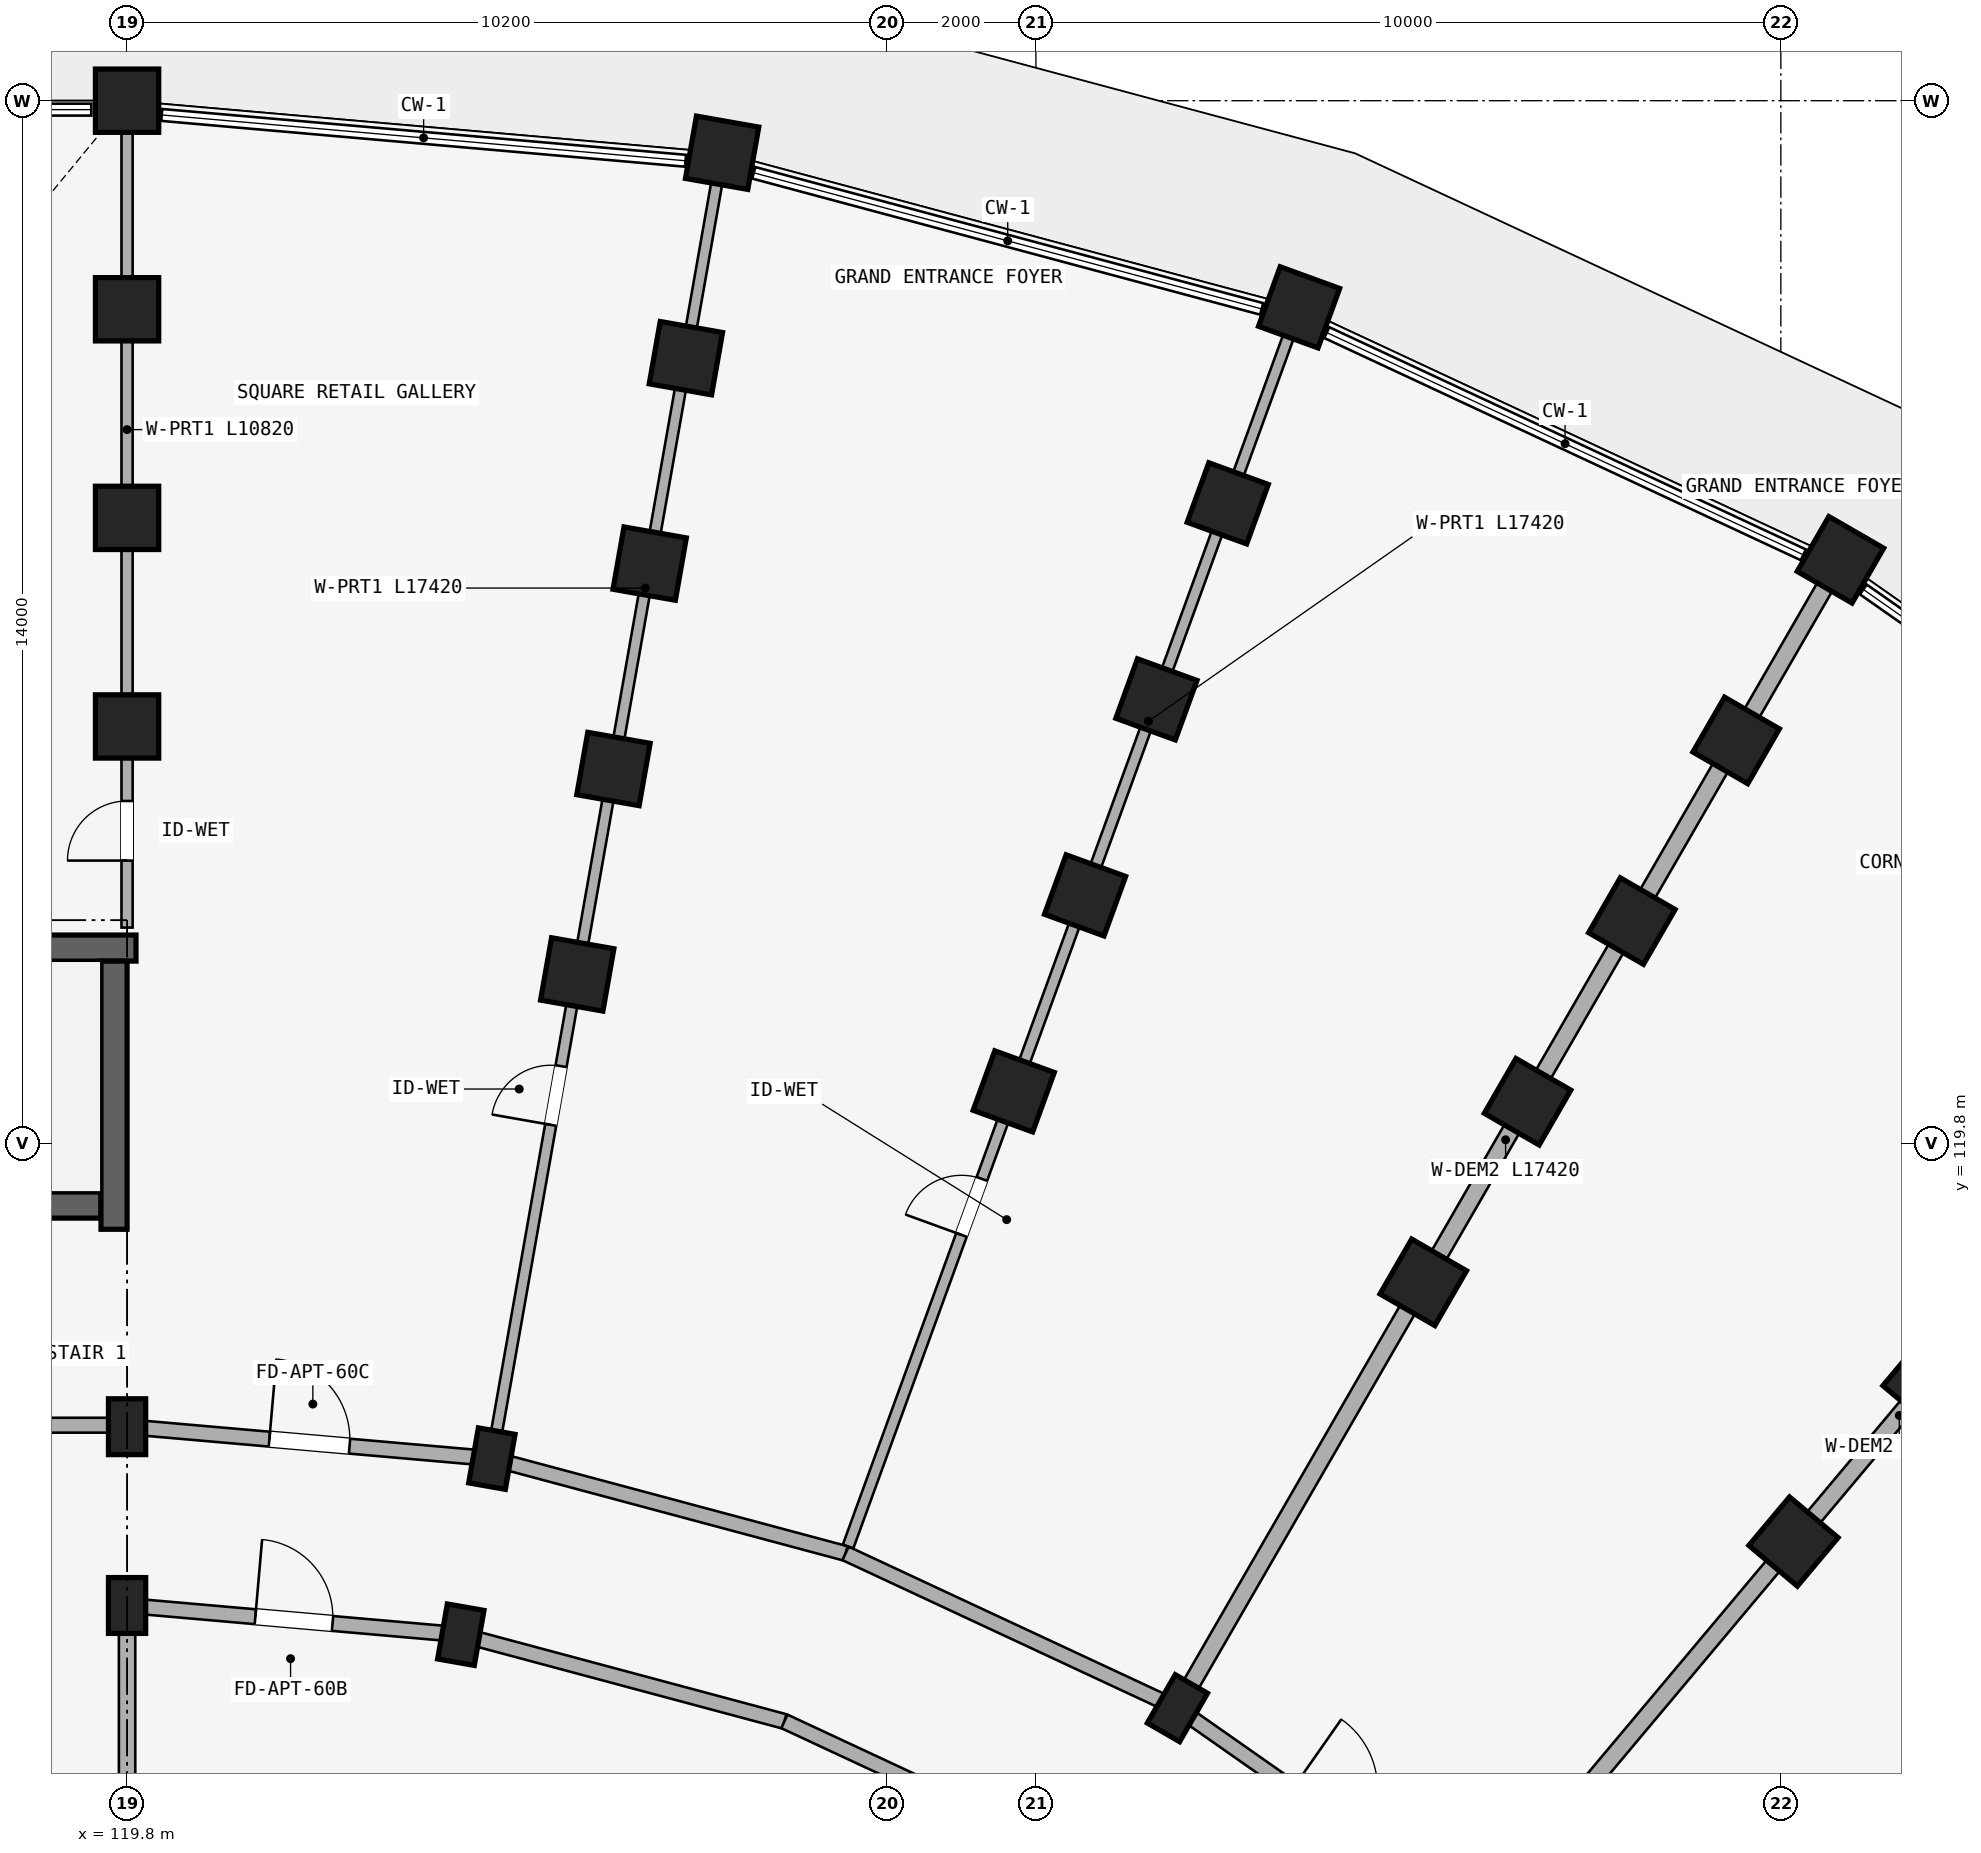
"""IFC4 building model, lengths in metres.
Left out: names, types, materials, properties, quantities, classifications, styles, units other than length and angle.
Written with IfcOpenShell. Run it as: python <this file> out.ifc"""

import sys

from ifc_helpers import new_model, si_unit, direction, frame, frame_2d, origin, origin_2d, place, context, subcontext, project, spatial, rectangle, extrude, element, fill, save


model = new_model("IFC4")
c1 = context("Model", 3, precision=1e-05, world=origin(), true_north=direction((0.0, 1.0)))
c2 = subcontext(c1, "Body", "Model", "MODEL_VIEW")
j1 = project(units=[si_unit("LENGTHUNIT", "METRE"), si_unit("PLANEANGLEUNIT", "RADIAN")], contexts=[c1])
p1 = place(None, origin())
s1 = spatial("IfcSite", under=j1, at=p1, CompositionType="ELEMENT")
p2 = place(p1, origin())
s2 = spatial("IfcBuilding", under=s1, at=p2, CompositionType="ELEMENT")
p3 = place(p2, origin())
s3 = spatial("IfcBuildingStorey", under=s2, at=p3, CompositionType="ELEMENT", Elevation=0.0)
p4 = place(p3, frame((119.92, 122.425, 0.0), z_axis=(0.0, 0.0, 1.0), x_axis=(-1.0, 0.0, 0.0)))
e1 = element("IfcWall", 1, at=p4, inside=s3, PredefinedType="SHEAR", context=c2, shape_type="SweptSolid", body=[
    extrude(rectangle(XDim=8.545, YDim=0.35, at=frame_2d((4.272, 0.0))), origin(), (0.0, 0.0, 1.0), 4.15),
])
p5 = place(p3, frame((119.45, 118.975, 0.0), z_axis=(0.0, 0.0, 1.0), x_axis=(-1.0, 0.0, 0.0)))
e2 = element("IfcWall", 2, at=p5, inside=s3, PredefinedType="SHEAR", context=c2, shape_type="SweptSolid", body=[
    extrude(rectangle(XDim=8.075, YDim=0.35, at=frame_2d((4.038, 0.0))), origin(), (0.0, 0.0, 1.0), 4.15),
])
p6 = place(p5, frame((6.38, 0.0, 0.0)))
e3 = element("IfcOpeningElement", 3, at=p6, cuts=e2, PredefinedType="OPENING", context=c2, shape_type="SweptSolid", body=[
    extrude(rectangle(XDim=1.24, YDim=2.15, at=frame_2d((0.62, 1.075))), frame((0.0, 0.185, 0.0), z_axis=(0.0, -1.0, 0.0), x_axis=(1.0, 0.0, 0.0)), (0.0, 0.0, 1.0), 0.37),
])
p7 = place(p3, frame((119.625, 118.65, 0.0), z_axis=(0.0, 0.0, 1.0), x_axis=(0.0, 1.0, 0.0)))
e4 = element("IfcWall", 4, at=p7, inside=s3, PredefinedType="SHEAR", context=c2, shape_type="SweptSolid", body=[
    extrude(rectangle(XDim=3.6, YDim=0.35, at=frame_2d((1.8, 0.0))), origin(), (0.0, 0.0, 1.0), 4.15),
])
for number, where, z_axis, x_axis in (
    (5, (119.8, 113.6, 0.0), (0.0, 0.0, 1.0), (1.0, 0.0, 0.0)),
    (6, (119.8, 116.0, 0.0), (0.0, 0.0, 1.0), (1.0, 0.0, 0.0)),
):
    element("IfcColumn", number, at=place(p3, frame(where, z_axis=z_axis, x_axis=x_axis)), inside=s3, PredefinedType="COLUMN", context=c2, shape_type="SweptSolid", body=[
        extrude(rectangle(XDim=0.5, YDim=0.75, at=origin_2d()), origin(), (0.0, 0.0, 1.0), 4.15),
    ])
for number, where, z_axis, x_axis in (
    (7, (119.8, 125.4, 0.0), (0.0, 0.0, 1.0), (1.0, 0.0, 0.0)),
    (8, (119.8, 128.2, 0.0), (0.0, 0.0, 1.0), (1.0, 0.0, 0.0)),
    (9, (119.8, 131.0, 0.0), (0.0, 0.0, 1.0), (1.0, 0.0, 0.0)),
    (10, (119.8, 133.8, 0.0), (0.0, 0.0, 1.0), (1.0, 0.0, 0.0)),
):
    element("IfcColumn", number, at=place(p3, frame(where, z_axis=z_axis, x_axis=x_axis)), inside=s3, PredefinedType="COLUMN", context=c2, shape_type="SweptSolid", body=[
        extrude(rectangle(XDim=0.85, YDim=0.85, at=origin_2d()), origin(), (0.0, 0.0, 1.0), 4.15),
    ])
for number, where, z_axis, x_axis in (
    (11, (124.28, 113.208, 0.0), (0.0, 0.0, 1.0), (-0.985, 0.174, 0.0)),
    (12, (124.697, 115.572, 0.0), (0.0, 0.0, 1.0), (-0.985, 0.174, 0.0)),
):
    element("IfcColumn", number, at=place(p3, frame(where, z_axis=z_axis, x_axis=x_axis)), inside=s3, PredefinedType="COLUMN", context=c2, shape_type="SweptSolid", body=[
        extrude(rectangle(XDim=0.5, YDim=0.75, at=origin_2d()), origin(), (0.0, 0.0, 1.0), 4.15),
    ])
for number, where, z_axis, x_axis in (
    (13, (125.843, 122.071, 0.0), (0.0, 0.0, 1.0), (-0.985, 0.174, 0.0)),
    (14, (126.329, 124.829, 0.0), (0.0, 0.0, 1.0), (-0.985, 0.174, 0.0)),
    (15, (126.815, 127.586, 0.0), (0.0, 0.0, 1.0), (-0.985, 0.174, 0.0)),
    (16, (127.302, 130.344, 0.0), (0.0, 0.0, 1.0), (-0.985, 0.174, 0.0)),
    (17, (127.788, 133.101, 0.0), (0.0, 0.0, 1.0), (-0.985, 0.174, 0.0)),
    (18, (131.702, 120.501, 0.0), (0.0, 0.0, 1.0), (-0.94, 0.342, 0.0)),
    (19, (132.66, 123.132, 0.0), (0.0, 0.0, 1.0), (-0.94, 0.342, 0.0)),
    (20, (133.618, 125.764, 0.0), (0.0, 0.0, 1.0), (-0.94, 0.342, 0.0)),
    (21, (134.575, 128.395, 0.0), (0.0, 0.0, 1.0), (-0.94, 0.342, 0.0)),
    (22, (135.533, 131.026, 0.0), (0.0, 0.0, 1.0), (-0.94, 0.342, 0.0)),
):
    element("IfcColumn", number, at=place(p3, frame(where, z_axis=z_axis, x_axis=x_axis)), inside=s3, PredefinedType="COLUMN", context=c2, shape_type="SweptSolid", body=[
        extrude(rectangle(XDim=0.85, YDim=0.85, at=origin_2d()), origin(), (0.0, 0.0, 1.0), 4.15),
    ])
p8 = place(p3, frame((133.9, 112.222, 0.0), z_axis=(0.0, 0.0, 1.0), x_axis=(-0.866025403784, 0.5, 0.0)))
e23 = element("IfcColumn", 23, at=p8, inside=s3, PredefinedType="COLUMN", context=c2, shape_type="SweptSolid", body=[
    extrude(rectangle(XDim=0.5, YDim=0.75, at=origin_2d()), origin(), (0.0, 0.0, 1.0), 4.15),
])
for number, where, z_axis, x_axis in (
    (24, (137.2, 117.938, 0.0), (0.0, 0.0, 1.0), (-0.866, 0.5, 0.0)),
    (25, (138.6, 120.363, 0.0), (0.0, 0.0, 1.0), (-0.866, 0.5, 0.0)),
    (26, (140.0, 122.787, 0.0), (0.0, 0.0, 1.0), (-0.866, 0.5, 0.0)),
    (27, (141.4, 125.212, 0.0), (0.0, 0.0, 1.0), (-0.866, 0.5, 0.0)),
    (28, (142.8, 127.637, 0.0), (0.0, 0.0, 1.0), (-0.866, 0.5, 0.0)),
    (29, (142.169, 114.458, 0.0), (0.0, 0.0, 1.0), (-0.766, 0.643, 0.0)),
    (30, (143.969, 116.603, 0.0), (0.0, 0.0, 1.0), (-0.766, 0.643, 0.0)),
):
    element("IfcColumn", number, at=place(p3, frame(where, z_axis=z_axis, x_axis=x_axis)), inside=s3, PredefinedType="COLUMN", context=c2, shape_type="SweptSolid", body=[
        extrude(rectangle(XDim=0.85, YDim=0.85, at=origin_2d()), origin(), (0.0, 0.0, 1.0), 4.15),
    ])
p9 = place(p3, frame((119.55, 116.02, 0.0), z_axis=(0.0, 0.0, 1.0), x_axis=(-1.0, 0.0, 0.0)))
e31 = element("IfcWall", 31, at=p9, inside=s3, PredefinedType="STANDARD", context=c2, shape_type="SweptSolid", body=[
    extrude(rectangle(XDim=5.25, YDim=0.2, at=frame_2d((2.625, 0.0))), origin(), (0.0, 0.0, 1.0), 3.492),
])
p10 = place(p9, frame((2.165, 0.0, 0.0)))
e32 = element("IfcOpeningElement", 32, at=p10, cuts=e31, PredefinedType="OPENING", context=c2, shape_type="SweptSolid", body=[
    extrude(rectangle(XDim=0.92, YDim=2.1, at=frame_2d((0.46, 1.05))), frame((0.0, 0.11, 0.0), z_axis=(0.0, -1.0, 0.0), x_axis=(1.0, 0.0, 0.0)), (0.0, 0.0, 1.0), 0.22),
])
p11 = place(p3, frame((119.8, 113.6, 0.0), z_axis=(0.0, 0.0, 1.0), x_axis=(0.996191949488, -0.087187153726, 0.0)))
e33 = element("IfcWall", 33, at=p11, inside=s3, PredefinedType="STANDARD", context=c2, shape_type="SweptSolid", body=[
    extrude(rectangle(XDim=4.497, YDim=0.2, at=frame_2d((2.249, 0.0))), origin(), (0.0, 0.0, 1.0), 3.492),
])
p12 = place(p11, frame((1.729, 0.0, 0.0)))
e34 = element("IfcOpeningElement", 34, at=p12, cuts=e33, PredefinedType="OPENING", context=c2, shape_type="SweptSolid", body=[
    extrude(rectangle(XDim=1.04, YDim=2.15, at=frame_2d((0.52, 1.075))), frame((0.0, 0.11, 0.0), z_axis=(0.0, -1.0, 0.0), x_axis=(1.0, 0.0, 0.0)), (0.0, 0.0, 1.0), 0.22),
])
p13 = place(p3, frame((119.8, 116.0, 0.0), z_axis=(0.0, 0.0, 1.0), x_axis=(0.996193663584, -0.087167566415, 0.0)))
e35 = element("IfcWall", 35, at=p13, inside=s3, PredefinedType="STANDARD", context=c2, shape_type="SweptSolid", body=[
    extrude(rectangle(XDim=4.916, YDim=0.2, at=frame_2d((2.458, 0.0))), origin(), (0.0, 0.0, 1.0), 3.492),
])
p14 = place(p13, frame((1.918, 0.0, 0.0)))
e36 = element("IfcOpeningElement", 36, at=p14, cuts=e35, PredefinedType="OPENING", context=c2, shape_type="SweptSolid", body=[
    extrude(rectangle(XDim=1.08, YDim=2.15, at=frame_2d((0.54, 1.075))), frame((0.0, 0.11, 0.0), z_axis=(0.0, -1.0, 0.0), x_axis=(1.0, 0.0, 0.0)), (0.0, 0.0, 1.0), 0.22),
])
p15 = place(p3, frame((124.28, 113.208, 0.0), z_axis=(0.0, 0.0, 1.0), x_axis=(0.965934240054, -0.258787642463, 0.0)))
e37 = element("IfcWall", 37, at=p15, inside=s3, PredefinedType="STANDARD", context=c2, shape_type="SweptSolid", body=[
    extrude(rectangle(XDim=4.497, YDim=0.2, at=frame_2d((2.249, 0.0))), origin(), (0.0, 0.0, 1.0), 2.742),
])
p16 = place(p3, frame((124.697, 115.572, 0.0), z_axis=(0.0, 0.0, 1.0), x_axis=(0.965930095386, -0.258803112091, 0.0)))
e38 = element("IfcWall", 38, at=p16, inside=s3, PredefinedType="STANDARD", context=c2, shape_type="SweptSolid", body=[
    extrude(rectangle(XDim=4.916, YDim=0.2, at=frame_2d((2.458, 0.0))), origin(), (0.0, 0.0, 1.0), 2.942),
])
p17 = place(p3, frame((128.624, 112.044, 0.0), z_axis=(0.0, 0.0, 1.0), x_axis=(0.906307919131, -0.422617978463, 0.0)))
e39 = element("IfcWall", 39, at=p17, inside=s3, PredefinedType="STANDARD", context=c2, shape_type="SweptSolid", body=[
    extrude(rectangle(XDim=4.497, YDim=0.2, at=frame_2d((2.249, 0.0))), origin(), (0.0, 0.0, 1.0), 2.742),
])
p18 = place(p3, frame((129.445, 114.299, 0.0), z_axis=(0.0, 0.0, 1.0), x_axis=(0.906302381024, -0.422629854778, 0.0)))
e40 = element("IfcWall", 40, at=p18, inside=s3, PredefinedType="STANDARD", context=c2, shape_type="SweptSolid", body=[
    extrude(rectangle(XDim=4.915, YDim=0.2, at=frame_2d((2.458, 0.0))), origin(), (0.0, 0.0, 1.0), 2.942),
])
p19 = place(p3, frame((133.9, 112.222, 0.0), z_axis=(0.0, 0.0, 1.0), x_axis=(0.819140911474, -0.573592335331, 0.0)))
e41 = element("IfcWall", 41, at=p19, inside=s3, PredefinedType="STANDARD", context=c2, shape_type="SweptSolid", body=[
    extrude(rectangle(XDim=4.916, YDim=0.2, at=frame_2d((2.458, 0.0))), origin(), (0.0, 0.0, 1.0), 3.492),
])
p20 = place(p19, frame((1.888, 0.0, 0.0)))
e42 = element("IfcOpeningElement", 42, at=p20, cuts=e41, PredefinedType="OPENING", context=c2, shape_type="SweptSolid", body=[
    extrude(rectangle(XDim=1.14, YDim=2.15, at=frame_2d((0.57, 1.075))), frame((0.0, 0.11, 0.0), z_axis=(0.0, -1.0, 0.0), x_axis=(1.0, 0.0, 0.0)), (0.0, 0.0, 1.0), 0.22),
])
p21 = place(p3, frame((119.8, 110.35, 0.0), z_axis=(0.0, 0.0, 1.0), x_axis=(0.0, 1.0, 0.0)))
e43 = element("IfcWall", 43, at=p21, inside=s3, PredefinedType="STANDARD", context=c2, shape_type="SweptSolid", body=[
    extrude(rectangle(XDim=3.2, YDim=0.22, at=frame_2d((1.6, 0.0))), origin(), (0.0, 0.0, 1.0), 3.492),
])
p22 = place(p3, frame((119.8, 122.7, 0.0), z_axis=(0.0, 0.0, 1.0), x_axis=(0.0, 1.0, 0.0)))
e44 = element("IfcWall", 44, at=p22, inside=s3, PredefinedType="PARTITIONING", context=c2, shape_type="SweptSolid", body=[
    extrude(rectangle(XDim=10.82, YDim=0.15, at=frame_2d((5.41, 0.0))), origin(), (0.0, 0.0, 1.0), 3.492),
])
p23 = place(p22, frame((0.899, 0.0, 0.0)))
e45 = element("IfcOpeningElement", 45, at=p23, cuts=e44, PredefinedType="OPENING", context=c2, shape_type="SweptSolid", body=[
    extrude(rectangle(XDim=0.8, YDim=2.1, at=frame_2d((0.4, 1.05))), frame((0.0, 0.085, 0.0), z_axis=(0.0, -1.0, 0.0), x_axis=(1.0, 0.0, 0.0)), (0.0, 0.0, 1.0), 0.17),
])
p24 = place(p3, frame((124.714, 115.67, 0.0), z_axis=(0.0, 0.0, 1.0), x_axis=(0.173646216546, 0.984808098809, 0.0)))
e46 = element("IfcWall", 46, at=p24, inside=s3, PredefinedType="PARTITIONING", context=c2, shape_type="SweptSolid", body=[
    extrude(rectangle(XDim=17.42, YDim=0.15, at=frame_2d((8.71, 0.0))), origin(), (0.0, 0.0, 1.0), 2.942),
])
p25 = place(p24, frame((4.45, 0.0, 0.0)))
e47 = element("IfcOpeningElement", 47, at=p25, cuts=e46, PredefinedType="OPENING", context=c2, shape_type="SweptSolid", body=[
    extrude(rectangle(XDim=0.8, YDim=2.1, at=frame_2d((0.4, 1.05))), frame((0.0, 0.085, 0.0), z_axis=(0.0, -1.0, 0.0), x_axis=(1.0, 0.0, 0.0)), (0.0, 0.0, 1.0), 0.17),
])
p26 = place(p3, frame((129.479, 114.393, 0.0), z_axis=(0.0, 0.0, 1.0), x_axis=(0.342022120477, 0.939691901159, 0.0)))
e48 = element("IfcWall", 48, at=p26, inside=s3, PredefinedType="PARTITIONING", context=c2, shape_type="SweptSolid", body=[
    extrude(rectangle(XDim=17.42, YDim=0.15, at=frame_2d((8.71, 0.0))), origin(), (0.0, 0.0, 1.0), 3.492),
])
p27 = place(p26, frame((4.45, 0.0, 0.0)))
e49 = element("IfcOpeningElement", 49, at=p27, cuts=e48, PredefinedType="OPENING", context=c2, shape_type="SweptSolid", body=[
    extrude(rectangle(XDim=0.8, YDim=2.1, at=frame_2d((0.4, 1.05))), frame((0.0, 0.085, 0.0), z_axis=(0.0, -1.0, 0.0), x_axis=(1.0, 0.0, 0.0)), (0.0, 0.0, 1.0), 0.17),
])
p28 = place(p3, frame((133.95, 112.309, 0.0), z_axis=(0.0, 0.0, 1.0), x_axis=(0.499997843263, 0.866026648973, 0.0)))
e50 = element("IfcWall", 50, at=p28, inside=s3, PredefinedType="STANDARD", context=c2, shape_type="SweptSolid", body=[
    extrude(rectangle(XDim=17.42, YDim=0.23, at=frame_2d((8.71, 0.0))), origin(), (0.0, 0.0, 1.0), 2.942),
])
p29 = place(p3, frame((137.991, 109.479, 0.0), z_axis=(0.0, 0.0, 1.0), x_axis=(0.642784757967, 0.766046835987, 0.0)))
e51 = element("IfcWall", 51, at=p29, inside=s3, PredefinedType="STANDARD", context=c2, shape_type="SweptSolid", body=[
    extrude(rectangle(XDim=17.42, YDim=0.23, at=frame_2d((8.71, 0.0))), origin(), (0.0, 0.0, 1.0), 3.492),
])
p30 = place(p3, frame((141.479, 105.991, 0.0), z_axis=(0.0, 0.0, 1.0), x_axis=(0.766046835987, 0.642784757967, 0.0)))
e52 = element("IfcWall", 52, at=p30, inside=s3, PredefinedType="PARTITIONING", context=c2, shape_type="SweptSolid", body=[
    extrude(rectangle(XDim=17.42, YDim=0.15, at=frame_2d((8.71, 0.0))), origin(), (0.0, 0.0, 1.0), 3.492),
])
p31 = place(p30, frame((4.45, 0.0, 0.0)))
e53 = element("IfcOpeningElement", 53, at=p31, cuts=e52, PredefinedType="OPENING", context=c2, shape_type="SweptSolid", body=[
    extrude(rectangle(XDim=0.8, YDim=2.1, at=frame_2d((0.4, 1.05))), frame((0.0, 0.085, 0.0), z_axis=(0.0, -1.0, 0.0), x_axis=(1.0, 0.0, 0.0)), (0.0, 0.0, 1.0), 0.17),
])
p32 = place(p23, origin())
e54 = element("IfcDoor", 54, at=p32, inside=s3, OperationType="SINGLE_SWING_LEFT", PredefinedType="DOOR", context=c2, shape_type="SweptSolid", body=[
    extrude(rectangle(XDim=0.8, YDim=2.1, at=frame_2d((0.4, 1.05))), frame((0.0, 0.025, 0.0), z_axis=(0.0, -1.0, 0.0), x_axis=(1.0, 0.0, 0.0)), (0.0, 0.0, 1.0), 0.05),
])
fill(e45, e54)
p33 = place(p25, frame((0.8, 0.0, 0.0), z_axis=(0.0, 0.0, 1.0), x_axis=(-1.0, 0.0, 0.0)))
e55 = element("IfcDoor", 55, at=p33, inside=s3, OperationType="SINGLE_SWING_RIGHT", PredefinedType="DOOR", context=c2, shape_type="SweptSolid", body=[
    extrude(rectangle(XDim=0.8, YDim=2.1, at=frame_2d((0.4, 1.05))), frame((0.0, 0.025, 0.0), z_axis=(0.0, -1.0, 0.0), x_axis=(1.0, 0.0, 0.0)), (0.0, 0.0, 1.0), 0.05),
])
fill(e47, e55)
p34 = place(p27, origin())
e56 = element("IfcDoor", 56, at=p34, inside=s3, OperationType="SINGLE_SWING_LEFT", PredefinedType="DOOR", context=c2, shape_type="SweptSolid", body=[
    extrude(rectangle(XDim=0.8, YDim=2.1, at=frame_2d((0.4, 1.05))), frame((0.0, 0.025, 0.0), z_axis=(0.0, -1.0, 0.0), x_axis=(1.0, 0.0, 0.0)), (0.0, 0.0, 1.0), 0.05),
])
fill(e49, e56)
p35 = place(p14, frame((1.08, 0.0, 0.0), z_axis=(0.0, 0.0, 1.0), x_axis=(-1.0, 0.0, 0.0)))
e57 = element("IfcDoor", 57, at=p35, inside=s3, OperationType="SINGLE_SWING_RIGHT", PredefinedType="DOOR", context=c2, shape_type="SweptSolid", body=[
    extrude(rectangle(XDim=1.08, YDim=2.15, at=frame_2d((0.54, 1.075))), frame((0.0, 0.025, 0.0), z_axis=(0.0, -1.0, 0.0), x_axis=(1.0, 0.0, 0.0)), (0.0, 0.0, 1.0), 0.05),
])
fill(e36, e57)
p36 = place(p12, origin())
e58 = element("IfcDoor", 58, at=p36, inside=s3, OperationType="SINGLE_SWING_LEFT", PredefinedType="DOOR", context=c2, shape_type="SweptSolid", body=[
    extrude(rectangle(XDim=1.04, YDim=2.15, at=frame_2d((0.52, 1.075))), frame((0.0, 0.025, 0.0), z_axis=(0.0, -1.0, 0.0), x_axis=(1.0, 0.0, 0.0)), (0.0, 0.0, 1.0), 0.05),
])
fill(e34, e58)
save(model, sys.argv[1])
